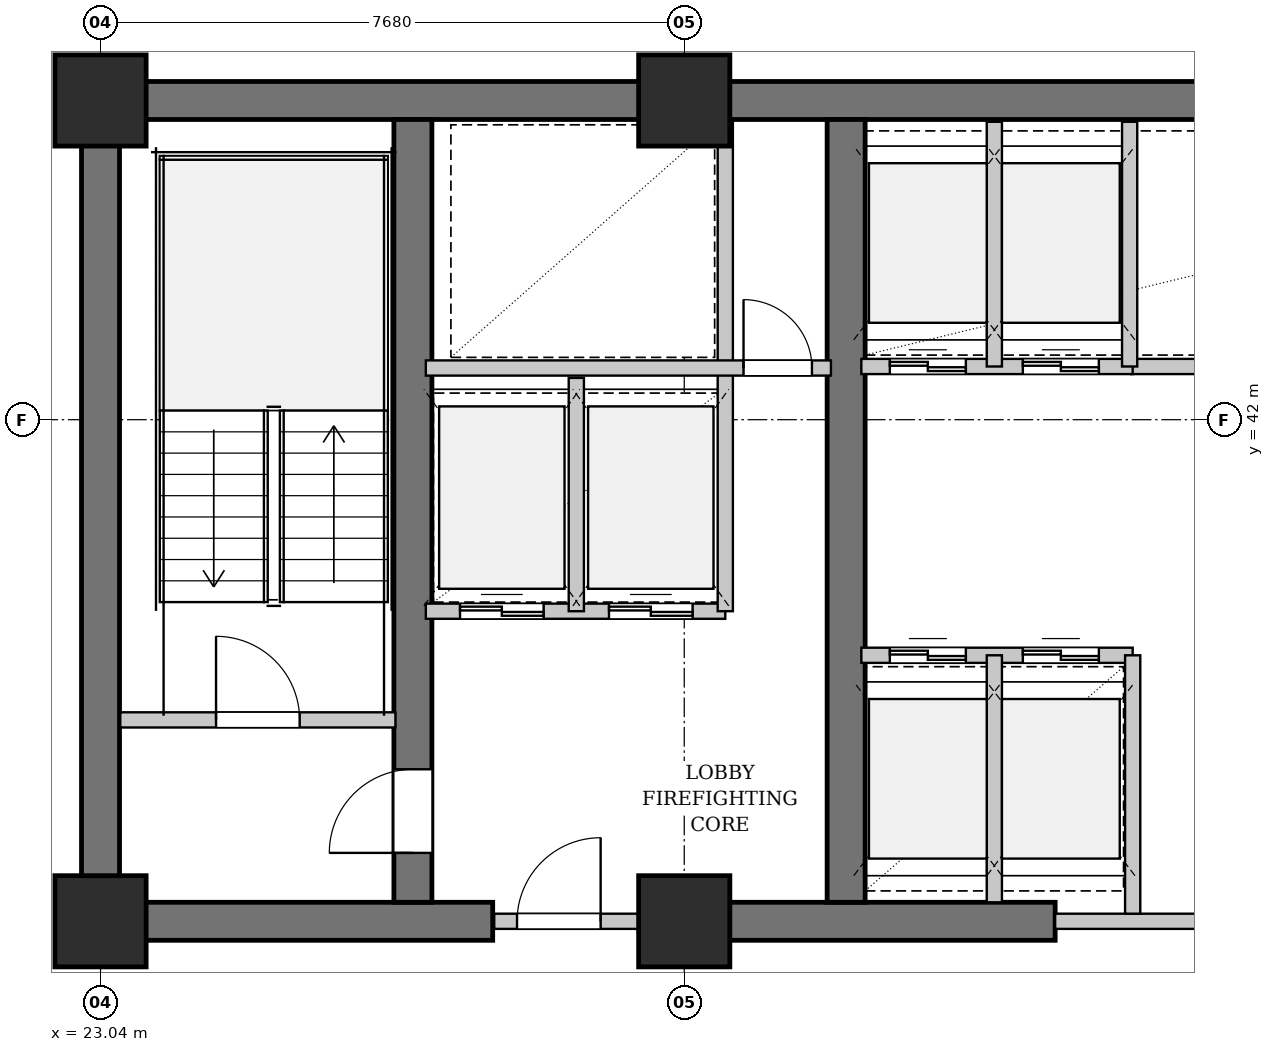
"""IFC4 building model, lengths in metres.
Left out: names, types, materials, properties, quantities, classifications, styles, units other than length and angle.
Written with IfcOpenShell. Run it as: python <this file> out.ifc"""

import sys

from ifc_helpers import new_model, si_unit, direction, frame, frame_2d, origin, origin_2d, place, context, subcontext, project, spatial, rectangle, extrude, element, fill, save


model = new_model("IFC4")
c1 = context("Model", 3, precision=1e-05, world=origin(), true_north=direction((0.0, 1.0)))
c2 = subcontext(c1, "Body", "Model", "MODEL_VIEW")
j1 = project(units=[si_unit("LENGTHUNIT", "METRE"), si_unit("PLANEANGLEUNIT", "RADIAN")], contexts=[c1])
p1 = place(None, origin())
s1 = spatial("IfcSite", under=j1, at=p1, CompositionType="ELEMENT")
p2 = place(p1, origin())
s2 = spatial("IfcBuilding", under=s1, at=p2, CompositionType="ELEMENT")
p3 = place(p2, frame((0.0, 0.0, 37.2)))
s3 = spatial("IfcBuildingStorey", under=s2, at=p3, CompositionType="ELEMENT", Elevation=37.2)
p4 = place(p3, frame((22.79, 46.2, 0.0), z_axis=(0.0, 0.0, 1.0), x_axis=(1.0, 0.0, 0.0)))
e1 = element("IfcWall", 1, at=p4, inside=s3, PredefinedType="SHEAR", context=c2, shape_type="SweptSolid", body=[
    extrude(rectangle(XDim=31.22, YDim=0.5, at=frame_2d((15.61, 0.0))), origin(), (0.0, 0.0, 1.0), 3.18),
])
p5 = place(p3, frame((22.79, 35.4, 0.0), z_axis=(0.0, 0.0, 1.0), x_axis=(1.0, 0.0, 0.0)))
e2 = element("IfcWall", 2, at=p5, inside=s3, PredefinedType="SHEAR", context=c2, shape_type="SweptSolid", body=[
    extrude(rectangle(XDim=5.41, YDim=0.5, at=frame_2d((2.705, 0.0))), origin(), (0.0, 0.0, 1.0), 3.18),
])
p6 = place(p3, frame((30.72, 35.4, 0.0), z_axis=(0.0, 0.0, 1.0), x_axis=(1.0, 0.0, 0.0)))
e3 = element("IfcWall", 3, at=p6, inside=s3, PredefinedType="SHEAR", context=c2, shape_type="SweptSolid", body=[
    extrude(rectangle(XDim=4.88, YDim=0.5, at=frame_2d((2.44, 0.0))), origin(), (0.0, 0.0, 1.0), 3.18),
])
p7 = place(p3, frame((23.04, 35.65, 0.0), z_axis=(0.0, 0.0, 1.0), x_axis=(0.0, 1.0, 0.0)))
e4 = element("IfcWall", 4, at=p7, inside=s3, PredefinedType="SHEAR", context=c2, shape_type="SweptSolid", body=[
    extrude(rectangle(XDim=10.3, YDim=0.5, at=frame_2d((5.15, 0.0))), origin(), (0.0, 0.0, 1.0), 3.18),
])
p8 = place(p3, frame((27.15, 35.65, 0.0), z_axis=(0.0, 0.0, 1.0), x_axis=(0.0, 1.0, 0.0)))
e5 = element("IfcWall", 5, at=p8, inside=s3, PredefinedType="SHEAR", context=c2, shape_type="SweptSolid", body=[
    extrude(rectangle(XDim=10.3, YDim=0.5, at=frame_2d((5.15, 0.0))), origin(), (0.0, 0.0, 1.0), 3.18),
])
p9 = place(p8, frame((0.65, 0.0, 0.0)))
e6 = element("IfcOpeningElement", 6, at=p9, cuts=e5, PredefinedType="OPENING", context=c2, shape_type="SweptSolid", body=[
    extrude(rectangle(XDim=1.1, YDim=2.15, at=frame_2d((0.55, 1.075))), frame((0.0, 0.26, 0.0), z_axis=(0.0, -1.0, 0.0), x_axis=(1.0, 0.0, 0.0)), (0.0, 0.0, 1.0), 0.52),
])
p10 = place(p3, frame((32.85, 35.65, 0.0), z_axis=(0.0, 0.0, 1.0), x_axis=(0.0, 1.0, 0.0)))
e7 = element("IfcWall", 7, at=p10, inside=s3, PredefinedType="SHEAR", context=c2, shape_type="SweptSolid", body=[
    extrude(rectangle(XDim=10.3, YDim=0.5, at=frame_2d((5.15, 0.0))), origin(), (0.0, 0.0, 1.0), 3.18),
])
for number, where, z_axis, x_axis in (
    (8, (23.04, 35.4, 0.0), (0.0, 0.0, 1.0), (1.0, 0.0, 0.0)),
    (9, (23.04, 46.2, 0.0), (0.0, 0.0, 1.0), (1.0, 0.0, 0.0)),
    (10, (30.72, 35.4, 0.0), (0.0, 0.0, 1.0), (1.0, 0.0, 0.0)),
    (11, (30.72, 46.2, 0.0), (0.0, 0.0, 1.0), (1.0, 0.0, 0.0)),
):
    element("IfcColumn", number, at=place(p3, frame(where, z_axis=z_axis, x_axis=x_axis)), inside=s3, PredefinedType="COLUMN", context=c2, shape_type="SweptSolid", body=[
        extrude(rectangle(XDim=1.2, YDim=1.2, at=origin_2d()), origin(), (0.0, 0.0, 1.0), 3.4),
    ])
p11 = place(p3, frame((23.3, 38.05, 0.0), z_axis=(0.0, 0.0, 1.0), x_axis=(1.0, 0.0, 0.0)))
e12 = element("IfcWall", 12, at=p11, inside=s3, PredefinedType="PARTITIONING", context=c2, shape_type="SweptSolid", body=[
    extrude(rectangle(XDim=3.62, YDim=0.2, at=frame_2d((1.81, 0.0))), origin(), (0.0, 0.0, 1.0), 3.18),
])
p12 = place(p11, frame((1.26, 0.0, 0.0)))
e13 = element("IfcOpeningElement", 13, at=p12, cuts=e12, PredefinedType="OPENING", context=c2, shape_type="SweptSolid", body=[
    extrude(rectangle(XDim=1.1, YDim=2.15, at=frame_2d((0.55, 1.075))), frame((0.0, 0.11, 0.0), z_axis=(0.0, -1.0, 0.0), x_axis=(1.0, 0.0, 0.0)), (0.0, 0.0, 1.0), 0.22),
])
p13 = place(p3, frame((28.22, 35.4, 0.0), z_axis=(0.0, 0.0, 1.0), x_axis=(1.0, 0.0, 0.0)))
e14 = element("IfcWall", 14, at=p13, inside=s3, PredefinedType="PARTITIONING", context=c2, shape_type="SweptSolid", body=[
    extrude(rectangle(XDim=2.5, YDim=0.2, at=frame_2d((1.25, 0.0))), origin(), (0.0, 0.0, 1.0), 2.475),
])
p14 = place(p13, frame((0.3, 0.0, 0.0)))
e15 = element("IfcOpeningElement", 15, at=p14, cuts=e14, PredefinedType="OPENING", context=c2, shape_type="SweptSolid", body=[
    extrude(rectangle(XDim=1.1, YDim=2.15, at=frame_2d((0.55, 1.075))), frame((0.0, 0.11, 0.0), z_axis=(0.0, -1.0, 0.0), x_axis=(1.0, 0.0, 0.0)), (0.0, 0.0, 1.0), 0.22),
])
p15 = place(p3, frame((27.32, 39.48, 0.0), z_axis=(0.0, 0.0, 1.0), x_axis=(1.0, 0.0, 0.0)))
e16 = element("IfcWall", 16, at=p15, inside=s3, PredefinedType="PARTITIONING", context=c2, shape_type="SweptSolid", body=[
    extrude(rectangle(XDim=3.94, YDim=0.2, at=frame_2d((1.97, 0.0))), origin(), (0.0, 0.0, 1.0), 3.18),
])
p16 = place(p15, frame((0.45, 0.0, 0.0)))
e17 = element("IfcOpeningElement", 17, at=p16, cuts=e16, PredefinedType="OPENING", context=c2, shape_type="SweptSolid", body=[
    extrude(rectangle(XDim=1.1, YDim=2.2, at=frame_2d((0.55, 1.1))), frame((0.0, 0.11, 0.0), z_axis=(0.0, -1.0, 0.0), x_axis=(1.0, 0.0, 0.0)), (0.0, 0.0, 1.0), 0.22),
])
p17 = place(p15, frame((2.41, 0.0, 0.0)))
e18 = element("IfcOpeningElement", 18, at=p17, cuts=e16, PredefinedType="OPENING", context=c2, shape_type="SweptSolid", body=[
    extrude(rectangle(XDim=1.1, YDim=2.2, at=frame_2d((0.55, 1.1))), frame((0.0, 0.11, 0.0), z_axis=(0.0, -1.0, 0.0), x_axis=(1.0, 0.0, 0.0)), (0.0, 0.0, 1.0), 0.22),
])
p18 = place(p3, frame((29.3, 39.48, 0.0), z_axis=(0.0, 0.0, 1.0), x_axis=(0.0, 1.0, 0.0)))
e19 = element("IfcWall", 19, at=p18, inside=s3, PredefinedType="PARTITIONING", context=c2, shape_type="SweptSolid", body=[
    extrude(rectangle(XDim=3.07, YDim=0.2, at=frame_2d((1.535, 0.0))), origin(), (0.0, 0.0, 1.0), 3.18),
])
p19 = place(p3, frame((31.26, 39.48, 0.0), z_axis=(0.0, 0.0, 1.0), x_axis=(0.0, 1.0, 0.0)))
e20 = element("IfcWall", 20, at=p19, inside=s3, PredefinedType="PARTITIONING", context=c2, shape_type="SweptSolid", body=[
    extrude(rectangle(XDim=6.44, YDim=0.2, at=frame_2d((3.22, 0.0))), origin(), (0.0, 0.0, 1.0), 3.18),
])
p20 = place(p3, frame((27.32, 42.68, 0.0), z_axis=(0.0, 0.0, 1.0), x_axis=(1.0, 0.0, 0.0)))
e21 = element("IfcWall", 21, at=p20, inside=s3, PredefinedType="PARTITIONING", context=c2, shape_type="SweptSolid", body=[
    extrude(rectangle(XDim=5.33, YDim=0.2, at=frame_2d((2.665, 0.0))), origin(), (0.0, 0.0, 1.0), 3.18),
])
p21 = place(p20, frame((4.18, 0.0, 0.0)))
e22 = element("IfcOpeningElement", 22, at=p21, cuts=e21, PredefinedType="OPENING", context=c2, shape_type="SweptSolid", body=[
    extrude(rectangle(XDim=0.9, YDim=2.15, at=frame_2d((0.45, 1.075))), frame((0.0, 0.11, 0.0), z_axis=(0.0, -1.0, 0.0), x_axis=(1.0, 0.0, 0.0)), (0.0, 0.0, 1.0), 0.22),
])
p22 = place(p3, frame((35.6, 35.4, 0.0), z_axis=(0.0, 0.0, 1.0), x_axis=(1.0, 0.0, 0.0)))
e23 = element("IfcWall", 23, at=p22, inside=s3, PredefinedType="PARTITIONING", context=c2, shape_type="SweptSolid", body=[
    extrude(rectangle(XDim=6.5, YDim=0.2, at=frame_2d((3.25, 0.0))), origin(), (0.0, 0.0, 1.0), 2.475),
])
p23 = place(p22, frame((3.8, 0.0, 0.0)))
e24 = element("IfcOpeningElement", 24, at=p23, cuts=e23, PredefinedType="OPENING", context=c2, shape_type="SweptSolid", body=[
    extrude(rectangle(XDim=1.8, YDim=2.3, at=frame_2d((0.9, 1.15))), frame((0.0, 0.11, 0.0), z_axis=(0.0, -1.0, 0.0), x_axis=(1.0, 0.0, 0.0)), (0.0, 0.0, 1.0), 0.22),
])
p24 = place(p3, frame((36.6, 42.7, 0.0), z_axis=(0.0, 0.0, 1.0), x_axis=(1.0, 0.0, 0.0)))
e25 = element("IfcWall", 25, at=p24, inside=s3, PredefinedType="PARTITIONING", context=c2, shape_type="SweptSolid", body=[
    extrude(rectangle(XDim=5.25, YDim=0.2, at=frame_2d((2.625, 0.0))), origin(), (0.0, 0.0, 1.0), 3.18),
])
p25 = place(p3, frame((33.05, 38.9, 0.0), z_axis=(0.0, 0.0, 1.0), x_axis=(1.0, 0.0, 0.0)))
e26 = element("IfcWall", 26, at=p25, inside=s3, PredefinedType="PARTITIONING", context=c2, shape_type="SweptSolid", body=[
    extrude(rectangle(XDim=3.57, YDim=0.2, at=frame_2d((1.785, 0.0))), origin(), (0.0, 0.0, 1.0), 3.18),
])
p26 = place(p25, frame((0.375, 0.0, 0.0)))
e27 = element("IfcOpeningElement", 27, at=p26, cuts=e26, PredefinedType="OPENING", context=c2, shape_type="SweptSolid", body=[
    extrude(rectangle(XDim=1.0, YDim=2.2, at=frame_2d((0.5, 1.1))), frame((0.0, 0.11, 0.0), z_axis=(0.0, -1.0, 0.0), x_axis=(1.0, 0.0, 0.0)), (0.0, 0.0, 1.0), 0.22),
])
p27 = place(p25, frame((2.125, 0.0, 0.0)))
e28 = element("IfcOpeningElement", 28, at=p27, cuts=e26, PredefinedType="OPENING", context=c2, shape_type="SweptSolid", body=[
    extrude(rectangle(XDim=1.0, YDim=2.2, at=frame_2d((0.5, 1.1))), frame((0.0, 0.11, 0.0), z_axis=(0.0, -1.0, 0.0), x_axis=(1.0, 0.0, 0.0)), (0.0, 0.0, 1.0), 0.22),
])
p28 = place(p3, frame((33.05, 42.7, 0.0), z_axis=(0.0, 0.0, 1.0), x_axis=(1.0, 0.0, 0.0)))
e29 = element("IfcWall", 29, at=p28, inside=s3, PredefinedType="PARTITIONING", context=c2, shape_type="SweptSolid", body=[
    extrude(rectangle(XDim=3.57, YDim=0.2, at=frame_2d((1.785, 0.0))), origin(), (0.0, 0.0, 1.0), 3.18),
])
p29 = place(p28, frame((0.375, 0.0, 0.0)))
e30 = element("IfcOpeningElement", 30, at=p29, cuts=e29, PredefinedType="OPENING", context=c2, shape_type="SweptSolid", body=[
    extrude(rectangle(XDim=1.0, YDim=2.2, at=frame_2d((0.5, 1.1))), frame((0.0, 0.11, 0.0), z_axis=(0.0, -1.0, 0.0), x_axis=(1.0, 0.0, 0.0)), (0.0, 0.0, 1.0), 0.22),
])
p30 = place(p28, frame((2.125, 0.0, 0.0)))
e31 = element("IfcOpeningElement", 31, at=p30, cuts=e29, PredefinedType="OPENING", context=c2, shape_type="SweptSolid", body=[
    extrude(rectangle(XDim=1.0, YDim=2.2, at=frame_2d((0.5, 1.1))), frame((0.0, 0.11, 0.0), z_axis=(0.0, -1.0, 0.0), x_axis=(1.0, 0.0, 0.0)), (0.0, 0.0, 1.0), 0.22),
])
p31 = place(p3, frame((34.8, 35.65, 0.0), z_axis=(0.0, 0.0, 1.0), x_axis=(0.0, 1.0, 0.0)))
e32 = element("IfcWall", 32, at=p31, inside=s3, PredefinedType="PARTITIONING", context=c2, shape_type="SweptSolid", body=[
    extrude(rectangle(XDim=3.25, YDim=0.2, at=frame_2d((1.625, 0.0))), origin(), (0.0, 0.0, 1.0), 3.18),
])
p32 = place(p3, frame((34.8, 42.7, 0.0), z_axis=(0.0, 0.0, 1.0), x_axis=(0.0, 1.0, 0.0)))
e33 = element("IfcWall", 33, at=p32, inside=s3, PredefinedType="PARTITIONING", context=c2, shape_type="SweptSolid", body=[
    extrude(rectangle(XDim=3.22, YDim=0.2, at=frame_2d((1.61, 0.0))), origin(), (0.0, 0.0, 1.0), 3.18),
])
p33 = place(p3, frame((36.62, 35.5, 0.0), z_axis=(0.0, 0.0, 1.0), x_axis=(0.0, 1.0, 0.0)))
e34 = element("IfcWall", 34, at=p33, inside=s3, PredefinedType="PARTITIONING", context=c2, shape_type="SweptSolid", body=[
    extrude(rectangle(XDim=3.4, YDim=0.2, at=frame_2d((1.7, 0.0))), origin(), (0.0, 0.0, 1.0), 3.18),
])
p34 = place(p3, frame((36.58, 42.7, 0.0), z_axis=(0.0, 0.0, 1.0), x_axis=(0.0, 1.0, 0.0)))
e35 = element("IfcWall", 35, at=p34, inside=s3, PredefinedType="PARTITIONING", context=c2, shape_type="SweptSolid", body=[
    extrude(rectangle(XDim=3.22, YDim=0.2, at=frame_2d((1.61, 0.0))), origin(), (0.0, 0.0, 1.0), 3.18),
])
p35 = place(p12, origin())
e36 = element("IfcDoor", 36, at=p35, inside=s3, OperationType="SINGLE_SWING_LEFT", PredefinedType="DOOR", context=c2, shape_type="SweptSolid", body=[
    extrude(rectangle(XDim=1.1, YDim=2.15, at=frame_2d((0.55, 1.075))), frame((0.0, 0.025, 0.0), z_axis=(0.0, -1.0, 0.0), x_axis=(1.0, 0.0, 0.0)), (0.0, 0.0, 1.0), 0.05),
])
fill(e13, e36)
p36 = place(p14, origin())
e37 = element("IfcDoor", 37, at=p36, inside=s3, OperationType="SINGLE_SWING_RIGHT", PredefinedType="DOOR", context=c2, shape_type="SweptSolid", body=[
    extrude(rectangle(XDim=1.1, YDim=2.15, at=frame_2d((0.55, 1.075))), frame((0.0, 0.025, 0.0), z_axis=(0.0, -1.0, 0.0), x_axis=(1.0, 0.0, 0.0)), (0.0, 0.0, 1.0), 0.05),
])
fill(e15, e37)
p37 = place(p16, origin())
e38 = element("IfcDoor", 38, at=p37, inside=s3, OperationType="DOUBLE_DOOR_SLIDING", PredefinedType="DOOR", context=c2, shape_type="SweptSolid", body=[
    extrude(rectangle(XDim=1.1, YDim=2.2, at=frame_2d((0.55, 1.1))), frame((0.0, 0.025, 0.0), z_axis=(0.0, -1.0, 0.0), x_axis=(1.0, 0.0, 0.0)), (0.0, 0.0, 1.0), 0.05),
])
fill(e17, e38)
p38 = place(p17, origin())
e39 = element("IfcDoor", 39, at=p38, inside=s3, OperationType="DOUBLE_DOOR_SLIDING", PredefinedType="DOOR", context=c2, shape_type="SweptSolid", body=[
    extrude(rectangle(XDim=1.1, YDim=2.2, at=frame_2d((0.55, 1.1))), frame((0.0, 0.025, 0.0), z_axis=(0.0, -1.0, 0.0), x_axis=(1.0, 0.0, 0.0)), (0.0, 0.0, 1.0), 0.05),
])
fill(e18, e39)
p39 = place(p21, origin())
e40 = element("IfcDoor", 40, at=p39, inside=s3, OperationType="SINGLE_SWING_LEFT", PredefinedType="DOOR", context=c2, shape_type="SweptSolid", body=[
    extrude(rectangle(XDim=0.9, YDim=2.15, at=frame_2d((0.45, 1.075))), frame((0.0, 0.025, 0.0), z_axis=(0.0, -1.0, 0.0), x_axis=(1.0, 0.0, 0.0)), (0.0, 0.0, 1.0), 0.05),
])
fill(e22, e40)
p40 = place(p26, origin())
e41 = element("IfcDoor", 41, at=p40, inside=s3, OperationType="DOUBLE_DOOR_SLIDING", PredefinedType="DOOR", context=c2, shape_type="SweptSolid", body=[
    extrude(rectangle(XDim=1.0, YDim=2.2, at=frame_2d((0.5, 1.1))), frame((0.0, 0.025, 0.0), z_axis=(0.0, -1.0, 0.0), x_axis=(1.0, 0.0, 0.0)), (0.0, 0.0, 1.0), 0.05),
])
fill(e27, e41)
p41 = place(p27, origin())
e42 = element("IfcDoor", 42, at=p41, inside=s3, OperationType="DOUBLE_DOOR_SLIDING", PredefinedType="DOOR", context=c2, shape_type="SweptSolid", body=[
    extrude(rectangle(XDim=1.0, YDim=2.2, at=frame_2d((0.5, 1.1))), frame((0.0, 0.025, 0.0), z_axis=(0.0, -1.0, 0.0), x_axis=(1.0, 0.0, 0.0)), (0.0, 0.0, 1.0), 0.05),
])
fill(e28, e42)
p42 = place(p29, origin())
e43 = element("IfcDoor", 43, at=p42, inside=s3, OperationType="DOUBLE_DOOR_SLIDING", PredefinedType="DOOR", context=c2, shape_type="SweptSolid", body=[
    extrude(rectangle(XDim=1.0, YDim=2.2, at=frame_2d((0.5, 1.1))), frame((0.0, 0.025, 0.0), z_axis=(0.0, -1.0, 0.0), x_axis=(1.0, 0.0, 0.0)), (0.0, 0.0, 1.0), 0.05),
])
fill(e30, e43)
p43 = place(p30, origin())
e44 = element("IfcDoor", 44, at=p43, inside=s3, OperationType="DOUBLE_DOOR_SLIDING", PredefinedType="DOOR", context=c2, shape_type="SweptSolid", body=[
    extrude(rectangle(XDim=1.0, YDim=2.2, at=frame_2d((0.5, 1.1))), frame((0.0, 0.025, 0.0), z_axis=(0.0, -1.0, 0.0), x_axis=(1.0, 0.0, 0.0)), (0.0, 0.0, 1.0), 0.05),
])
fill(e31, e44)
p44 = place(p9, origin())
e45 = element("IfcDoor", 45, at=p44, inside=s3, OperationType="SINGLE_SWING_LEFT", PredefinedType="DOOR", context=c2, shape_type="SweptSolid", body=[
    extrude(rectangle(XDim=1.1, YDim=2.15, at=frame_2d((0.55, 1.075))), frame((0.0, 0.025, 0.0), z_axis=(0.0, -1.0, 0.0), x_axis=(1.0, 0.0, 0.0)), (0.0, 0.0, 1.0), 0.05),
])
fill(e6, e45)
save(model, sys.argv[1])
